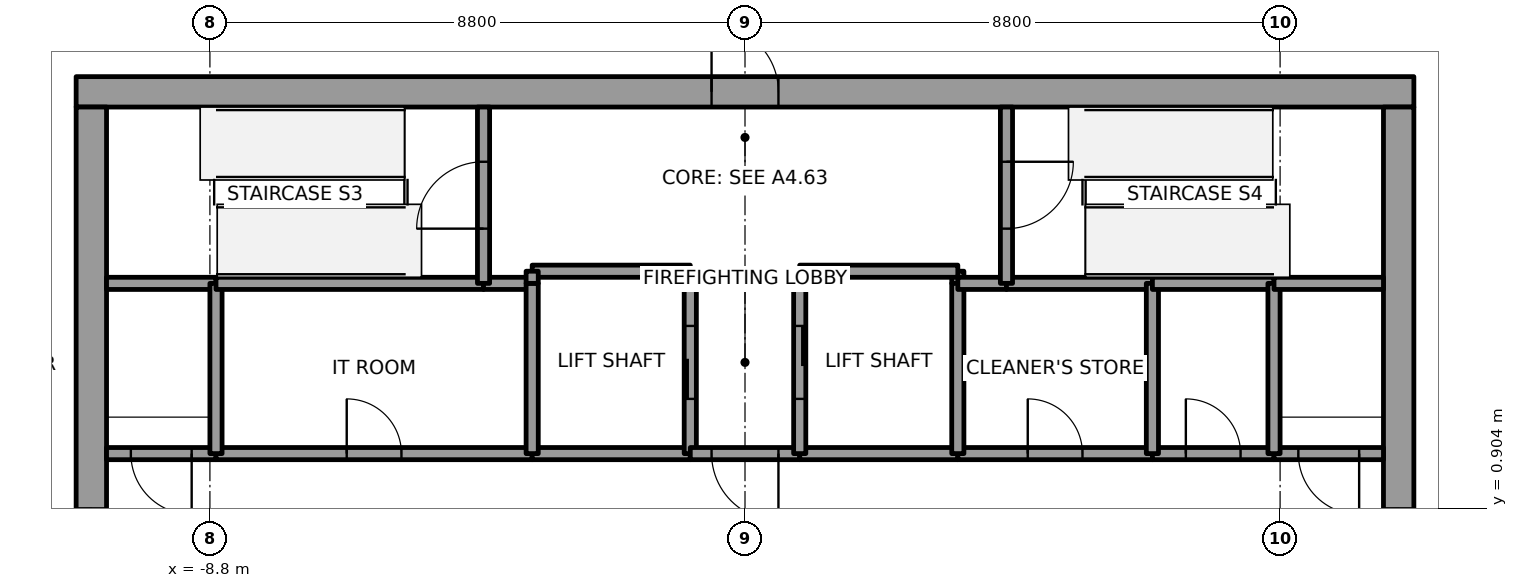
"""IFC4 building model, lengths in metres.
Left out: names, types, materials, properties, quantities, classifications, styles, units other than length and angle.
Written with IfcOpenShell. Run it as: python <this file> out.ifc"""

import sys

from ifc_helpers import new_model, si_unit, direction, frame, frame_2d, origin, place, context, subcontext, project, spatial, rectangle, extrude, element, fill, save


model = new_model("IFC4")
c1 = context("Model", 3, precision=1e-05, world=origin(), true_north=direction((0.0, 1.0)))
c2 = subcontext(c1, "Body", "Model", "MODEL_VIEW")
j1 = project(units=[si_unit("LENGTHUNIT", "METRE"), si_unit("PLANEANGLEUNIT", "RADIAN")], contexts=[c1])
p1 = place(None, origin())
s1 = spatial("IfcSite", under=j1, at=p1, CompositionType="ELEMENT")
p2 = place(p1, origin())
s2 = spatial("IfcBuilding", under=s1, at=p2, CompositionType="ELEMENT")
p3 = place(p2, frame((0.0, 0.0, 271.0)))
s3 = spatial("IfcBuildingStorey", under=s2, at=p3, CompositionType="ELEMENT", Elevation=271.0)
p4 = place(p3, frame((-11.0, 7.75, 0.0), z_axis=(0.0, 0.0, 1.0), x_axis=(1.0, 0.0, 0.0)))
e1 = element("IfcWall", 1, at=p4, inside=s3, PredefinedType="SHEAR", context=c2, shape_type="SweptSolid", body=[
    extrude(rectangle(XDim=22.0, YDim=0.5, at=frame_2d((11.0, 0.0))), origin(), (0.0, 0.0, 1.0), 4.0),
])
p5 = place(p4, frame((10.45, 0.0, 0.0)))
e2 = element("IfcOpeningElement", 2, at=p5, cuts=e1, PredefinedType="OPENING", context=c2, shape_type="SweptSolid", body=[
    extrude(rectangle(XDim=1.1, YDim=2.1, at=frame_2d((0.55, 1.05))), frame((0.0, 0.25, 0.0), z_axis=(0.0, -1.0, 0.0), x_axis=(1.0, 0.0, 0.0)), (0.0, 0.0, 1.0), 0.5),
])
p6 = place(p3, frame((-10.75, -7.5, 0.0), z_axis=(0.0, 0.0, 1.0), x_axis=(0.0, 1.0, 0.0)))
e3 = element("IfcWall", 3, at=p6, inside=s3, PredefinedType="SHEAR", context=c2, shape_type="SweptSolid", body=[
    extrude(rectangle(XDim=15.0, YDim=0.5, at=frame_2d((7.5, 0.0))), origin(), (0.0, 0.0, 1.0), 4.0),
])
p7 = place(p6, frame((6.6, 0.0, 0.0)))
e4 = element("IfcOpeningElement", 4, at=p7, cuts=e3, PredefinedType="OPENING", context=c2, shape_type="SweptSolid", body=[
    extrude(rectangle(XDim=1.8, YDim=2.1, at=frame_2d((0.9, 1.05))), frame((0.0, 0.25, 0.0), z_axis=(0.0, -1.0, 0.0), x_axis=(1.0, 0.0, 0.0)), (0.0, 0.0, 1.0), 0.5),
])
p8 = place(p3, frame((10.75, -7.5, 0.0), z_axis=(0.0, 0.0, 1.0), x_axis=(0.0, 1.0, 0.0)))
e5 = element("IfcWall", 5, at=p8, inside=s3, PredefinedType="SHEAR", context=c2, shape_type="SweptSolid", body=[
    extrude(rectangle(XDim=15.0, YDim=0.5, at=frame_2d((7.5, 0.0))), origin(), (0.0, 0.0, 1.0), 4.0),
])
p9 = place(p8, frame((6.6, 0.0, 0.0)))
e6 = element("IfcOpeningElement", 6, at=p9, cuts=e5, PredefinedType="OPENING", context=c2, shape_type="SweptSolid", body=[
    extrude(rectangle(XDim=1.8, YDim=2.1, at=frame_2d((0.9, 1.05))), frame((0.0, 0.25, 0.0), z_axis=(0.0, -1.0, 0.0), x_axis=(1.0, 0.0, 0.0)), (0.0, 0.0, 1.0), 0.5),
])
p10 = place(p3, frame((-8.7, 1.8, 0.0), z_axis=(0.0, 0.0, 1.0), x_axis=(-1.0, 0.0, 0.0)))
e7 = element("IfcWall", 7, at=p10, inside=s3, PredefinedType="SOLIDWALL", context=c2, shape_type="SweptSolid", body=[
    extrude(rectangle(XDim=1.8, YDim=0.2, at=frame_2d((0.9, 0.0))), origin(), (0.0, 0.0, 1.0), 3.85),
])
p11 = place(p10, frame((0.4, 0.0, 0.0)))
e8 = element("IfcOpeningElement", 8, at=p11, cuts=e7, PredefinedType="OPENING", context=c2, shape_type="SweptSolid", body=[
    extrude(rectangle(XDim=1.0, YDim=2.1, at=frame_2d((0.5, 1.05))), frame((0.0, 0.1, 0.0), z_axis=(0.0, -1.0, 0.0), x_axis=(1.0, 0.0, 0.0)), (0.0, 0.0, 1.0), 0.2),
])
p12 = place(p3, frame((-8.7, 4.6, 0.0), z_axis=(0.0, 0.0, 1.0), x_axis=(-1.0, 0.0, 0.0)))
e9 = element("IfcWall", 9, at=p12, inside=s3, PredefinedType="SOLIDWALL", context=c2, shape_type="SweptSolid", body=[
    extrude(rectangle(XDim=1.8, YDim=0.2, at=frame_2d((0.9, 0.0))), origin(), (0.0, 0.0, 1.0), 3.85),
])
p13 = place(p3, frame((-8.7, 1.8, 0.0), z_axis=(0.0, 0.0, 1.0), x_axis=(1.0, 0.0, 0.0)))
e10 = element("IfcWall", 10, at=p13, inside=s3, PredefinedType="SOLIDWALL", context=c2, shape_type="SweptSolid", body=[
    extrude(rectangle(XDim=5.2, YDim=0.2, at=frame_2d((2.6, 0.0))), origin(), (0.0, 0.0, 1.0), 3.85),
])
p14 = place(p13, frame((2.15, 0.0, 0.0)))
e11 = element("IfcOpeningElement", 11, at=p14, cuts=e10, PredefinedType="OPENING", context=c2, shape_type="SweptSolid", body=[
    extrude(rectangle(XDim=0.9, YDim=2.1, at=frame_2d((0.45, 1.05))), frame((0.0, 0.1, 0.0), z_axis=(0.0, -1.0, 0.0), x_axis=(1.0, 0.0, 0.0)), (0.0, 0.0, 1.0), 0.2),
])
p15 = place(p3, frame((-8.7, 4.6, 0.0), z_axis=(0.0, 0.0, 1.0), x_axis=(0.0, -1.0, 0.0)))
e12 = element("IfcWall", 12, at=p15, inside=s3, PredefinedType="SOLIDWALL", context=c2, shape_type="SweptSolid", body=[
    extrude(rectangle(XDim=2.8, YDim=0.2, at=frame_2d((1.4, 0.0))), origin(), (0.0, 0.0, 1.0), 3.85),
])
p16 = place(p3, frame((-4.3, 4.6, 0.0), z_axis=(0.0, 0.0, 1.0), x_axis=(-1.0, 0.0, 0.0)))
e13 = element("IfcWall", 13, at=p16, inside=s3, PredefinedType="SOLIDWALL", context=c2, shape_type="SweptSolid", body=[
    extrude(rectangle(XDim=4.4, YDim=0.2, at=frame_2d((2.2, 0.0))), origin(), (0.0, 0.0, 1.0), 3.85),
])
p17 = place(p3, frame((-3.5, 4.6, 0.0), z_axis=(0.0, 0.0, 1.0), x_axis=(-1.0, 0.0, 0.0)))
e14 = element("IfcWall", 14, at=p17, inside=s3, PredefinedType="SOLIDWALL", context=c2, shape_type="SweptSolid", body=[
    extrude(rectangle(XDim=0.8, YDim=0.2, at=frame_2d((0.4, 0.0))), origin(), (0.0, 0.0, 1.0), 3.85),
])
p18 = place(p3, frame((-4.3, 4.6, 0.0), z_axis=(0.0, 0.0, 1.0), x_axis=(0.0, 1.0, 0.0)))
e15 = element("IfcWall", 15, at=p18, inside=s3, PredefinedType="SOLIDWALL", context=c2, shape_type="SweptSolid", body=[
    extrude(rectangle(XDim=2.9, YDim=0.2, at=frame_2d((1.45, 0.0))), origin(), (0.0, 0.0, 1.0), 3.85),
])
p19 = place(p18, frame((0.9, 0.0, 0.0)))
e16 = element("IfcOpeningElement", 16, at=p19, cuts=e15, PredefinedType="OPENING", context=c2, shape_type="SweptSolid", body=[
    extrude(rectangle(XDim=1.1, YDim=2.1, at=frame_2d((0.55, 1.05))), frame((0.0, 0.1, 0.0), z_axis=(0.0, -1.0, 0.0), x_axis=(1.0, 0.0, 0.0)), (0.0, 0.0, 1.0), 0.2),
])
p20 = place(p3, frame((-0.9, 1.8, 0.0), z_axis=(0.0, 0.0, 1.0), x_axis=(-1.0, 0.0, 0.0)))
e17 = element("IfcWall", 17, at=p20, inside=s3, PredefinedType="SOLIDWALL", context=c2, shape_type="SweptSolid", body=[
    extrude(rectangle(XDim=2.6, YDim=0.2, at=frame_2d((1.3, 0.0))), origin(), (0.0, 0.0, 1.0), 3.85),
])
p21 = place(p3, frame((-3.5, 1.8, 0.0), z_axis=(0.0, 0.0, 1.0), x_axis=(0.0, 1.0, 0.0)))
e18 = element("IfcWall", 18, at=p21, inside=s3, PredefinedType="SOLIDWALL", context=c2, shape_type="SweptSolid", body=[
    extrude(rectangle(XDim=2.8, YDim=0.2, at=frame_2d((1.4, 0.0))), origin(), (0.0, 0.0, 1.0), 3.85),
])
p22 = place(p3, frame((-0.9, 1.8, 0.0), z_axis=(0.0, 0.0, 1.0), x_axis=(0.0, 1.0, 0.0)))
e19 = element("IfcWall", 19, at=p22, inside=s3, PredefinedType="SOLIDWALL", context=c2, shape_type="SweptSolid", body=[
    extrude(rectangle(XDim=3.0, YDim=0.2, at=frame_2d((1.5, 0.0))), origin(), (0.0, 0.0, 1.0), 3.85),
])
p23 = place(p22, frame((0.9, 0.0, 0.0)))
e20 = element("IfcOpeningElement", 20, at=p23, cuts=e19, PredefinedType="OPENING", context=c2, shape_type="SweptSolid", body=[
    extrude(rectangle(XDim=1.2, YDim=2.1, at=frame_2d((0.6, 1.05))), frame((0.0, 0.1, 0.0), z_axis=(0.0, -1.0, 0.0), x_axis=(1.0, 0.0, 0.0)), (0.0, 0.0, 1.0), 0.2),
])
p24 = place(p3, frame((-0.9, 4.8, 0.0), z_axis=(0.0, 0.0, 1.0), x_axis=(-1.0, 0.0, 0.0)))
e21 = element("IfcWall", 21, at=p24, inside=s3, PredefinedType="SOLIDWALL", context=c2, shape_type="SweptSolid", body=[
    extrude(rectangle(XDim=2.6, YDim=0.2, at=frame_2d((1.3, 0.0))), origin(), (0.0, 0.0, 1.0), 3.85),
])
p25 = place(p3, frame((-3.5, 4.8, 0.0), z_axis=(0.0, 0.0, 1.0), x_axis=(0.0, -1.0, 0.0)))
e22 = element("IfcWall", 22, at=p25, inside=s3, PredefinedType="SOLIDWALL", context=c2, shape_type="SweptSolid", body=[
    extrude(rectangle(XDim=0.2, YDim=0.2, at=frame_2d((0.1, 0.0))), origin(), (0.0, 0.0, 1.0), 3.85),
])
p26 = place(p3, frame((0.9, 1.8, 0.0), z_axis=(0.0, 0.0, 1.0), x_axis=(-1.0, 0.0, 0.0)))
e23 = element("IfcWall", 23, at=p26, inside=s3, PredefinedType="SOLIDWALL", context=c2, shape_type="SweptSolid", body=[
    extrude(rectangle(XDim=1.8, YDim=0.2, at=frame_2d((0.9, 0.0))), origin(), (0.0, 0.0, 1.0), 3.85),
])
p27 = place(p26, frame((0.35, 0.0, 0.0)))
e24 = element("IfcOpeningElement", 24, at=p27, cuts=e23, PredefinedType="OPENING", context=c2, shape_type="SweptSolid", body=[
    extrude(rectangle(XDim=1.1, YDim=2.1, at=frame_2d((0.55, 1.05))), frame((0.0, 0.1, 0.0), z_axis=(0.0, -1.0, 0.0), x_axis=(1.0, 0.0, 0.0)), (0.0, 0.0, 1.0), 0.2),
])
p28 = place(p3, frame((3.5, 1.8, 0.0), z_axis=(0.0, 0.0, 1.0), x_axis=(-1.0, 0.0, 0.0)))
e25 = element("IfcWall", 25, at=p28, inside=s3, PredefinedType="SOLIDWALL", context=c2, shape_type="SweptSolid", body=[
    extrude(rectangle(XDim=2.6, YDim=0.2, at=frame_2d((1.3, 0.0))), origin(), (0.0, 0.0, 1.0), 3.85),
])
p29 = place(p3, frame((3.5, 4.6, 0.0), z_axis=(0.0, 0.0, 1.0), x_axis=(0.0, 1.0, 0.0)))
e26 = element("IfcWall", 26, at=p29, inside=s3, PredefinedType="SOLIDWALL", context=c2, shape_type="SweptSolid", body=[
    extrude(rectangle(XDim=0.2, YDim=0.2, at=frame_2d((0.1, 0.0))), origin(), (0.0, 0.0, 1.0), 3.85),
])
p30 = place(p3, frame((3.5, 4.8, 0.0), z_axis=(0.0, 0.0, 1.0), x_axis=(-1.0, 0.0, 0.0)))
e27 = element("IfcWall", 27, at=p30, inside=s3, PredefinedType="SOLIDWALL", context=c2, shape_type="SweptSolid", body=[
    extrude(rectangle(XDim=2.6, YDim=0.2, at=frame_2d((1.3, 0.0))), origin(), (0.0, 0.0, 1.0), 3.85),
])
p31 = place(p3, frame((0.9, 4.8, 0.0), z_axis=(0.0, 0.0, 1.0), x_axis=(0.0, -1.0, 0.0)))
e28 = element("IfcWall", 28, at=p31, inside=s3, PredefinedType="SOLIDWALL", context=c2, shape_type="SweptSolid", body=[
    extrude(rectangle(XDim=3.0, YDim=0.2, at=frame_2d((1.5, 0.0))), origin(), (0.0, 0.0, 1.0), 3.85),
])
p32 = place(p31, frame((0.9, 0.0, 0.0)))
e29 = element("IfcOpeningElement", 29, at=p32, cuts=e28, PredefinedType="OPENING", context=c2, shape_type="SweptSolid", body=[
    extrude(rectangle(XDim=1.2, YDim=2.1, at=frame_2d((0.6, 1.05))), frame((0.0, 0.1, 0.0), z_axis=(0.0, -1.0, 0.0), x_axis=(1.0, 0.0, 0.0)), (0.0, 0.0, 1.0), 0.2),
])
p33 = place(p3, frame((3.5, 1.8, 0.0), z_axis=(0.0, 0.0, 1.0), x_axis=(1.0, 0.0, 0.0)))
e30 = element("IfcWall", 30, at=p33, inside=s3, PredefinedType="SOLIDWALL", context=c2, shape_type="SweptSolid", body=[
    extrude(rectangle(XDim=3.2, YDim=0.2, at=frame_2d((1.6, 0.0))), origin(), (0.0, 0.0, 1.0), 3.85),
])
p34 = place(p33, frame((1.15, 0.0, 0.0)))
e31 = element("IfcOpeningElement", 31, at=p34, cuts=e30, PredefinedType="OPENING", context=c2, shape_type="SweptSolid", body=[
    extrude(rectangle(XDim=0.9, YDim=2.1, at=frame_2d((0.45, 1.05))), frame((0.0, 0.1, 0.0), z_axis=(0.0, -1.0, 0.0), x_axis=(1.0, 0.0, 0.0)), (0.0, 0.0, 1.0), 0.2),
])
p35 = place(p3, frame((3.5, 4.6, 0.0), z_axis=(0.0, 0.0, 1.0), x_axis=(0.0, -1.0, 0.0)))
e32 = element("IfcWall", 32, at=p35, inside=s3, PredefinedType="SOLIDWALL", context=c2, shape_type="SweptSolid", body=[
    extrude(rectangle(XDim=2.8, YDim=0.2, at=frame_2d((1.4, 0.0))), origin(), (0.0, 0.0, 1.0), 3.85),
])
p36 = place(p3, frame((4.3, 4.6, 0.0), z_axis=(0.0, 0.0, 1.0), x_axis=(-1.0, 0.0, 0.0)))
e33 = element("IfcWall", 33, at=p36, inside=s3, PredefinedType="SOLIDWALL", context=c2, shape_type="SweptSolid", body=[
    extrude(rectangle(XDim=0.8, YDim=0.2, at=frame_2d((0.4, 0.0))), origin(), (0.0, 0.0, 1.0), 3.85),
])
p37 = place(p3, frame((6.7, 4.6, 0.0), z_axis=(0.0, 0.0, 1.0), x_axis=(-1.0, 0.0, 0.0)))
e34 = element("IfcWall", 34, at=p37, inside=s3, PredefinedType="SOLIDWALL", context=c2, shape_type="SweptSolid", body=[
    extrude(rectangle(XDim=2.4, YDim=0.2, at=frame_2d((1.2, 0.0))), origin(), (0.0, 0.0, 1.0), 3.85),
])
p38 = place(p3, frame((4.3, 7.5, 0.0), z_axis=(0.0, 0.0, 1.0), x_axis=(0.0, -1.0, 0.0)))
e35 = element("IfcWall", 35, at=p38, inside=s3, PredefinedType="SOLIDWALL", context=c2, shape_type="SweptSolid", body=[
    extrude(rectangle(XDim=2.9, YDim=0.2, at=frame_2d((1.45, 0.0))), origin(), (0.0, 0.0, 1.0), 3.85),
])
p39 = place(p38, frame((0.9, 0.0, 0.0)))
e36 = element("IfcOpeningElement", 36, at=p39, cuts=e35, PredefinedType="OPENING", context=c2, shape_type="SweptSolid", body=[
    extrude(rectangle(XDim=1.1, YDim=2.1, at=frame_2d((0.55, 1.05))), frame((0.0, 0.1, 0.0), z_axis=(0.0, -1.0, 0.0), x_axis=(1.0, 0.0, 0.0)), (0.0, 0.0, 1.0), 0.2),
])
p40 = place(p3, frame((6.7, 1.8, 0.0), z_axis=(0.0, 0.0, 1.0), x_axis=(1.0, 0.0, 0.0)))
e37 = element("IfcWall", 37, at=p40, inside=s3, PredefinedType="SOLIDWALL", context=c2, shape_type="SweptSolid", body=[
    extrude(rectangle(XDim=2.0, YDim=0.2, at=frame_2d((1.0, 0.0))), origin(), (0.0, 0.0, 1.0), 3.85),
])
p41 = place(p40, frame((0.55, 0.0, 0.0)))
e38 = element("IfcOpeningElement", 38, at=p41, cuts=e37, PredefinedType="OPENING", context=c2, shape_type="SweptSolid", body=[
    extrude(rectangle(XDim=0.9, YDim=2.1, at=frame_2d((0.45, 1.05))), frame((0.0, 0.1, 0.0), z_axis=(0.0, -1.0, 0.0), x_axis=(1.0, 0.0, 0.0)), (0.0, 0.0, 1.0), 0.2),
])
p42 = place(p3, frame((6.7, 1.8, 0.0), z_axis=(0.0, 0.0, 1.0), x_axis=(0.0, 1.0, 0.0)))
e39 = element("IfcWall", 39, at=p42, inside=s3, PredefinedType="SOLIDWALL", context=c2, shape_type="SweptSolid", body=[
    extrude(rectangle(XDim=2.8, YDim=0.2, at=frame_2d((1.4, 0.0))), origin(), (0.0, 0.0, 1.0), 3.85),
])
p43 = place(p3, frame((8.7, 4.6, 0.0), z_axis=(0.0, 0.0, 1.0), x_axis=(-1.0, 0.0, 0.0)))
e40 = element("IfcWall", 40, at=p43, inside=s3, PredefinedType="SOLIDWALL", context=c2, shape_type="SweptSolid", body=[
    extrude(rectangle(XDim=2.0, YDim=0.2, at=frame_2d((1.0, 0.0))), origin(), (0.0, 0.0, 1.0), 3.85),
])
p44 = place(p3, frame((10.5, 1.8, 0.0), z_axis=(0.0, 0.0, 1.0), x_axis=(-1.0, 0.0, 0.0)))
e41 = element("IfcWall", 41, at=p44, inside=s3, PredefinedType="SOLIDWALL", context=c2, shape_type="SweptSolid", body=[
    extrude(rectangle(XDim=1.8, YDim=0.2, at=frame_2d((0.9, 0.0))), origin(), (0.0, 0.0, 1.0), 3.85),
])
p45 = place(p44, frame((0.4, 0.0, 0.0)))
e42 = element("IfcOpeningElement", 42, at=p45, cuts=e41, PredefinedType="OPENING", context=c2, shape_type="SweptSolid", body=[
    extrude(rectangle(XDim=1.0, YDim=2.1, at=frame_2d((0.5, 1.05))), frame((0.0, 0.1, 0.0), z_axis=(0.0, -1.0, 0.0), x_axis=(1.0, 0.0, 0.0)), (0.0, 0.0, 1.0), 0.2),
])
p46 = place(p3, frame((8.7, 1.8, 0.0), z_axis=(0.0, 0.0, 1.0), x_axis=(0.0, 1.0, 0.0)))
e43 = element("IfcWall", 43, at=p46, inside=s3, PredefinedType="SOLIDWALL", context=c2, shape_type="SweptSolid", body=[
    extrude(rectangle(XDim=2.8, YDim=0.2, at=frame_2d((1.4, 0.0))), origin(), (0.0, 0.0, 1.0), 3.85),
])
p47 = place(p3, frame((10.5, 4.6, 0.0), z_axis=(0.0, 0.0, 1.0), x_axis=(-1.0, 0.0, 0.0)))
e44 = element("IfcWall", 44, at=p47, inside=s3, PredefinedType="SOLIDWALL", context=c2, shape_type="SweptSolid", body=[
    extrude(rectangle(XDim=1.8, YDim=0.2, at=frame_2d((0.9, 0.0))), origin(), (0.0, 0.0, 1.0), 3.85),
])
p48 = place(p23, origin())
e45 = element("IfcDoor", 45, at=p48, inside=s3, OperationType="SLIDING_TO_RIGHT", PredefinedType="DOOR", context=c2, shape_type="SweptSolid", body=[
    extrude(rectangle(XDim=1.2, YDim=2.1, at=frame_2d((0.6, 1.05))), frame((0.0, 0.025, 0.0), z_axis=(0.0, -1.0, 0.0), x_axis=(1.0, 0.0, 0.0)), (0.0, 0.0, 1.0), 0.05),
])
fill(e20, e45)
p49 = place(p32, origin())
e46 = element("IfcDoor", 46, at=p49, inside=s3, OperationType="SLIDING_TO_LEFT", PredefinedType="DOOR", context=c2, shape_type="SweptSolid", body=[
    extrude(rectangle(XDim=1.2, YDim=2.1, at=frame_2d((0.6, 1.05))), frame((0.0, 0.025, 0.0), z_axis=(0.0, -1.0, 0.0), x_axis=(1.0, 0.0, 0.0)), (0.0, 0.0, 1.0), 0.05),
])
fill(e29, e46)
p50 = place(p27, origin())
e47 = element("IfcDoor", 47, at=p50, inside=s3, OperationType="SINGLE_SWING_LEFT", PredefinedType="DOOR", context=c2, shape_type="SweptSolid", body=[
    extrude(rectangle(XDim=1.1, YDim=2.1, at=frame_2d((0.55, 1.05))), frame((0.0, 0.025, 0.0), z_axis=(0.0, -1.0, 0.0), x_axis=(1.0, 0.0, 0.0)), (0.0, 0.0, 1.0), 0.05),
])
fill(e24, e47)
p51 = place(p11, origin())
e48 = element("IfcDoor", 48, at=p51, inside=s3, OperationType="SINGLE_SWING_RIGHT", PredefinedType="DOOR", context=c2, shape_type="SweptSolid", body=[
    extrude(rectangle(XDim=1.0, YDim=2.1, at=frame_2d((0.5, 1.05))), frame((0.0, 0.025, 0.0), z_axis=(0.0, -1.0, 0.0), x_axis=(1.0, 0.0, 0.0)), (0.0, 0.0, 1.0), 0.05),
])
fill(e8, e48)
p52 = place(p45, origin())
e49 = element("IfcDoor", 49, at=p52, inside=s3, OperationType="SINGLE_SWING_LEFT", PredefinedType="DOOR", context=c2, shape_type="SweptSolid", body=[
    extrude(rectangle(XDim=1.0, YDim=2.1, at=frame_2d((0.5, 1.05))), frame((0.0, 0.025, 0.0), z_axis=(0.0, -1.0, 0.0), x_axis=(1.0, 0.0, 0.0)), (0.0, 0.0, 1.0), 0.05),
])
fill(e42, e49)
p53 = place(p19, origin())
e50 = element("IfcDoor", 50, at=p53, inside=s3, OperationType="SINGLE_SWING_RIGHT", PredefinedType="DOOR", context=c2, shape_type="SweptSolid", body=[
    extrude(rectangle(XDim=1.1, YDim=2.1, at=frame_2d((0.55, 1.05))), frame((0.0, 0.025, 0.0), z_axis=(0.0, -1.0, 0.0), x_axis=(1.0, 0.0, 0.0)), (0.0, 0.0, 1.0), 0.05),
])
fill(e16, e50)
p54 = place(p39, origin())
e51 = element("IfcDoor", 51, at=p54, inside=s3, OperationType="SINGLE_SWING_RIGHT", PredefinedType="DOOR", context=c2, shape_type="SweptSolid", body=[
    extrude(rectangle(XDim=1.1, YDim=2.1, at=frame_2d((0.55, 1.05))), frame((0.0, 0.025, 0.0), z_axis=(0.0, -1.0, 0.0), x_axis=(1.0, 0.0, 0.0)), (0.0, 0.0, 1.0), 0.05),
])
fill(e36, e51)
p55 = place(p34, origin())
e52 = element("IfcDoor", 52, at=p55, inside=s3, OperationType="SINGLE_SWING_LEFT", PredefinedType="DOOR", context=c2, shape_type="SweptSolid", body=[
    extrude(rectangle(XDim=0.9, YDim=2.1, at=frame_2d((0.45, 1.05))), frame((0.0, 0.025, 0.0), z_axis=(0.0, -1.0, 0.0), x_axis=(1.0, 0.0, 0.0)), (0.0, 0.0, 1.0), 0.05),
])
fill(e31, e52)
p56 = place(p41, origin())
e53 = element("IfcDoor", 53, at=p56, inside=s3, OperationType="SINGLE_SWING_RIGHT", PredefinedType="DOOR", context=c2, shape_type="SweptSolid", body=[
    extrude(rectangle(XDim=0.9, YDim=2.1, at=frame_2d((0.45, 1.05))), frame((0.0, 0.025, 0.0), z_axis=(0.0, -1.0, 0.0), x_axis=(1.0, 0.0, 0.0)), (0.0, 0.0, 1.0), 0.05),
])
fill(e38, e53)
p57 = place(p14, origin())
e54 = element("IfcDoor", 54, at=p57, inside=s3, OperationType="SINGLE_SWING_RIGHT", PredefinedType="DOOR", context=c2, shape_type="SweptSolid", body=[
    extrude(rectangle(XDim=0.9, YDim=2.1, at=frame_2d((0.45, 1.05))), frame((0.0, 0.025, 0.0), z_axis=(0.0, -1.0, 0.0), x_axis=(1.0, 0.0, 0.0)), (0.0, 0.0, 1.0), 0.05),
])
fill(e11, e54)
p58 = place(p7, origin())
e55 = element("IfcDoor", 55, at=p58, inside=s3, OperationType="DOUBLE_DOOR_SINGLE_SWING", PredefinedType="DOOR", context=c2, shape_type="SweptSolid", body=[
    extrude(rectangle(XDim=1.8, YDim=2.1, at=frame_2d((0.9, 1.05))), frame((0.0, 0.025, 0.0), z_axis=(0.0, -1.0, 0.0), x_axis=(1.0, 0.0, 0.0)), (0.0, 0.0, 1.0), 0.05),
])
fill(e4, e55)
p59 = place(p9, origin())
e56 = element("IfcDoor", 56, at=p59, inside=s3, OperationType="DOUBLE_DOOR_SINGLE_SWING", PredefinedType="DOOR", context=c2, shape_type="SweptSolid", body=[
    extrude(rectangle(XDim=1.8, YDim=2.1, at=frame_2d((0.9, 1.05))), frame((0.0, 0.025, 0.0), z_axis=(0.0, -1.0, 0.0), x_axis=(1.0, 0.0, 0.0)), (0.0, 0.0, 1.0), 0.05),
])
fill(e6, e56)
p60 = place(p5, origin())
e57 = element("IfcDoor", 57, at=p60, inside=s3, OperationType="SINGLE_SWING_LEFT", PredefinedType="DOOR", context=c2, shape_type="SweptSolid", body=[
    extrude(rectangle(XDim=1.1, YDim=2.1, at=frame_2d((0.55, 1.05))), frame((0.0, 0.025, 0.0), z_axis=(0.0, -1.0, 0.0), x_axis=(1.0, 0.0, 0.0)), (0.0, 0.0, 1.0), 0.05),
])
fill(e2, e57)
save(model, sys.argv[1])
